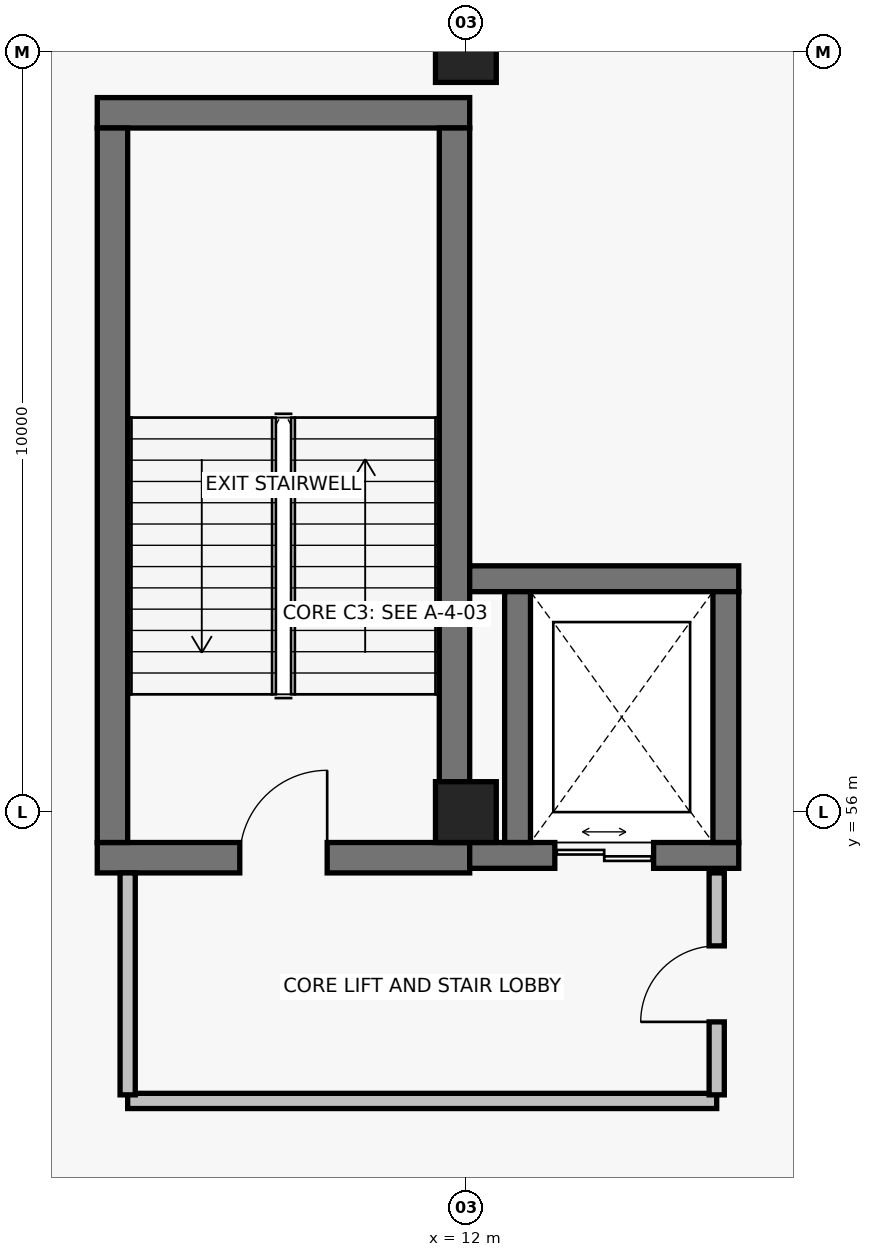
"""IFC4 building model, lengths in metres.
Left out: names, types, materials, properties, quantities, classifications, styles, units other than length and angle.
Written with IfcOpenShell. Run it as: python <this file> out.ifc"""

import sys

from ifc_helpers import new_model, si_unit, direction, frame, frame_2d, origin, origin_2d, place, context, subcontext, project, spatial, rectangle, extrude, element, fill, save


model = new_model("IFC4")
c1 = context("Model", 3, precision=1e-05, world=origin(), true_north=direction((0.0, 1.0)))
c2 = subcontext(c1, "Body", "Model", "MODEL_VIEW")
j1 = project(units=[si_unit("LENGTHUNIT", "METRE"), si_unit("PLANEANGLEUNIT", "RADIAN")], contexts=[c1])
p1 = place(None, origin())
s1 = spatial("IfcSite", under=j1, at=p1, CompositionType="ELEMENT")
p2 = place(p1, origin())
s2 = spatial("IfcBuilding", under=s1, at=p2, CompositionType="ELEMENT")
p3 = place(p2, frame((0.0, 0.0, -4.8)))
s3 = spatial("IfcBuildingStorey", under=s2, at=p3, CompositionType="ELEMENT", Elevation=-4.8)
for number, where, z_axis, x_axis in (
    (1, (12.0, 56.0, 0.0), (0.0, 0.0, 1.0), (1.0, 0.0, 0.0)),
    (2, (12.0, 66.0, 0.0), (0.0, 0.0, 1.0), (1.0, 0.0, 0.0)),
):
    element("IfcColumn", number, at=place(p3, frame(where, z_axis=z_axis, x_axis=x_axis)), inside=s3, PredefinedType="COLUMN", context=c2, shape_type="SweptSolid", body=[
        extrude(rectangle(XDim=0.8, YDim=0.8, at=origin_2d()), origin(), (0.0, 0.0, 1.0), 4.8),
    ])
p4 = place(p3, frame((7.15, 55.4, 0.0), z_axis=(0.0, 0.0, 1.0), x_axis=(1.0, 0.0, 0.0)))
e3 = element("IfcWall", 3, at=p4, inside=s3, PredefinedType="SHEAR", context=c2, shape_type="SweptSolid", body=[
    extrude(rectangle(XDim=4.9, YDim=0.4, at=frame_2d((2.45, 0.0))), origin(), (0.0, 0.0, 1.0), 4.4),
])
p5 = place(p4, frame((1.875, 0.0, 0.0)))
e4 = element("IfcOpeningElement", 4, at=p5, cuts=e3, PredefinedType="OPENING", context=c2, shape_type="SweptSolid", body=[
    extrude(rectangle(XDim=1.15, YDim=2.15, at=frame_2d((0.575, 1.075))), frame((0.0, 0.215, 0.0), z_axis=(0.0, -1.0, 0.0), x_axis=(1.0, 0.0, 0.0)), (0.0, 0.0, 1.0), 0.43),
])
p6 = place(p3, frame((12.05, 65.2, 0.0), z_axis=(0.0, 0.0, 1.0), x_axis=(-1.0, 0.0, 0.0)))
e5 = element("IfcWall", 5, at=p6, inside=s3, PredefinedType="SHEAR", context=c2, shape_type="SweptSolid", body=[
    extrude(rectangle(XDim=4.9, YDim=0.4, at=frame_2d((2.45, 0.0))), origin(), (0.0, 0.0, 1.0), 4.4),
])
for number, where, z_axis, x_axis in (
    (6, (7.35, 65.0, 0.0), (0.0, 0.0, 1.0), (0.0, -1.0, 0.0)),
    (7, (11.85, 55.6, 0.0), (0.0, 0.0, 1.0), (0.0, 1.0, 0.0)),
):
    element("IfcWall", number, at=place(p3, frame(where, z_axis=z_axis, x_axis=x_axis)), inside=s3, PredefinedType="SHEAR", context=c2, shape_type="SweptSolid", body=[
        extrude(rectangle(XDim=9.4, YDim=0.4, at=frame_2d((4.7, 0.0))), origin(), (0.0, 0.0, 1.0), 4.4),
    ])
p7 = place(p3, frame((12.05, 55.43, 0.0), z_axis=(0.0, 0.0, 1.0), x_axis=(1.0, 0.0, 0.0)))
e8 = element("IfcWall", 8, at=p7, inside=s3, PredefinedType="SHEAR", context=c2, shape_type="SweptSolid", body=[
    extrude(rectangle(XDim=3.54, YDim=0.34, at=frame_2d((1.77, 0.0))), origin(), (0.0, 0.0, 1.0), 4.4),
])
p8 = place(p7, frame((1.12, 0.0, 0.0)))
e9 = element("IfcOpeningElement", 9, at=p8, cuts=e8, PredefinedType="OPENING", context=c2, shape_type="SweptSolid", body=[
    extrude(rectangle(XDim=1.3, YDim=2.25, at=frame_2d((0.65, 1.125))), frame((0.0, 0.185, 0.0), z_axis=(0.0, -1.0, 0.0), x_axis=(1.0, 0.0, 0.0)), (0.0, 0.0, 1.0), 0.37),
])
p9 = place(p3, frame((15.59, 59.07, 0.0), z_axis=(0.0, 0.0, 1.0), x_axis=(-1.0, 0.0, 0.0)))
e10 = element("IfcWall", 10, at=p9, inside=s3, PredefinedType="SHEAR", context=c2, shape_type="SweptSolid", body=[
    extrude(rectangle(XDim=3.54, YDim=0.34, at=frame_2d((1.77, 0.0))), origin(), (0.0, 0.0, 1.0), 4.4),
])
for number, where, z_axis, x_axis in (
    (11, (12.68, 58.9, 0.0), (0.0, 0.0, 1.0), (0.0, -1.0, 0.0)),
    (12, (15.42, 55.6, 0.0), (0.0, 0.0, 1.0), (0.0, 1.0, 0.0)),
):
    element("IfcWall", number, at=place(p3, frame(where, z_axis=z_axis, x_axis=x_axis)), inside=s3, PredefinedType="SHEAR", context=c2, shape_type="SweptSolid", body=[
        extrude(rectangle(XDim=3.3, YDim=0.34, at=frame_2d((1.65, 0.0))), origin(), (0.0, 0.0, 1.0), 4.4),
    ])
p10 = place(p3, frame((7.55, 52.2, 0.0), z_axis=(0.0, 0.0, 1.0), x_axis=(1.0, 0.0, 0.0)))
e13 = element("IfcWall", 13, at=p10, inside=s3, PredefinedType="PARTITIONING", context=c2, shape_type="SweptSolid", body=[
    extrude(rectangle(XDim=7.75, YDim=0.2, at=frame_2d((3.875, 0.0))), origin(), (0.0, 0.0, 1.0), 3.587),
])
p11 = place(p3, frame((7.55, 55.2, 0.0), z_axis=(0.0, 0.0, 1.0), x_axis=(0.0, -1.0, 0.0)))
e14 = element("IfcWall", 14, at=p11, inside=s3, PredefinedType="PARTITIONING", context=c2, shape_type="SweptSolid", body=[
    extrude(rectangle(XDim=2.92, YDim=0.2, at=frame_2d((1.46, 0.0))), origin(), (0.0, 0.0, 1.0), 4.4),
])
p12 = place(p3, frame((15.3, 52.28, 0.0), z_axis=(0.0, 0.0, 1.0), x_axis=(0.0, 1.0, 0.0)))
e15 = element("IfcWall", 15, at=p12, inside=s3, PredefinedType="PARTITIONING", context=c2, shape_type="SweptSolid", body=[
    extrude(rectangle(XDim=2.92, YDim=0.2, at=frame_2d((1.46, 0.0))), origin(), (0.0, 0.0, 1.0), 4.4),
])
p13 = place(p12, frame((0.96, 0.0, 0.0)))
e16 = element("IfcOpeningElement", 16, at=p13, cuts=e15, PredefinedType="OPENING", context=c2, shape_type="SweptSolid", body=[
    extrude(rectangle(XDim=1.0, YDim=2.15, at=frame_2d((0.5, 1.075))), frame((0.0, 0.115, 0.0), z_axis=(0.0, -1.0, 0.0), x_axis=(1.0, 0.0, 0.0)), (0.0, 0.0, 1.0), 0.23),
])
p14 = place(p5, origin())
e17 = element("IfcDoor", 17, at=p14, inside=s3, OperationType="SINGLE_SWING_RIGHT", PredefinedType="DOOR", context=c2, shape_type="SweptSolid", body=[
    extrude(rectangle(XDim=1.15, YDim=2.15, at=frame_2d((0.575, 1.075))), frame((0.0, 0.025, 0.0), z_axis=(0.0, -1.0, 0.0), x_axis=(1.0, 0.0, 0.0)), (0.0, 0.0, 1.0), 0.05),
])
fill(e4, e17)
p15 = place(p8, origin())
e18 = element("IfcDoor", 18, at=p15, inside=s3, OperationType="DOUBLE_DOOR_SLIDING", PredefinedType="DOOR", context=c2, shape_type="SweptSolid", body=[
    extrude(rectangle(XDim=1.3, YDim=2.25, at=frame_2d((0.65, 1.125))), frame((0.0, 0.025, 0.0), z_axis=(0.0, -1.0, 0.0), x_axis=(1.0, 0.0, 0.0)), (0.0, 0.0, 1.0), 0.05),
])
fill(e9, e18)
p16 = place(p13, origin())
e19 = element("IfcDoor", 19, at=p16, inside=s3, OperationType="SINGLE_SWING_LEFT", PredefinedType="DOOR", context=c2, shape_type="SweptSolid", body=[
    extrude(rectangle(XDim=1.0, YDim=2.15, at=frame_2d((0.5, 1.075))), frame((0.0, 0.025, 0.0), z_axis=(0.0, -1.0, 0.0), x_axis=(1.0, 0.0, 0.0)), (0.0, 0.0, 1.0), 0.05),
])
fill(e16, e19)
save(model, sys.argv[1])
